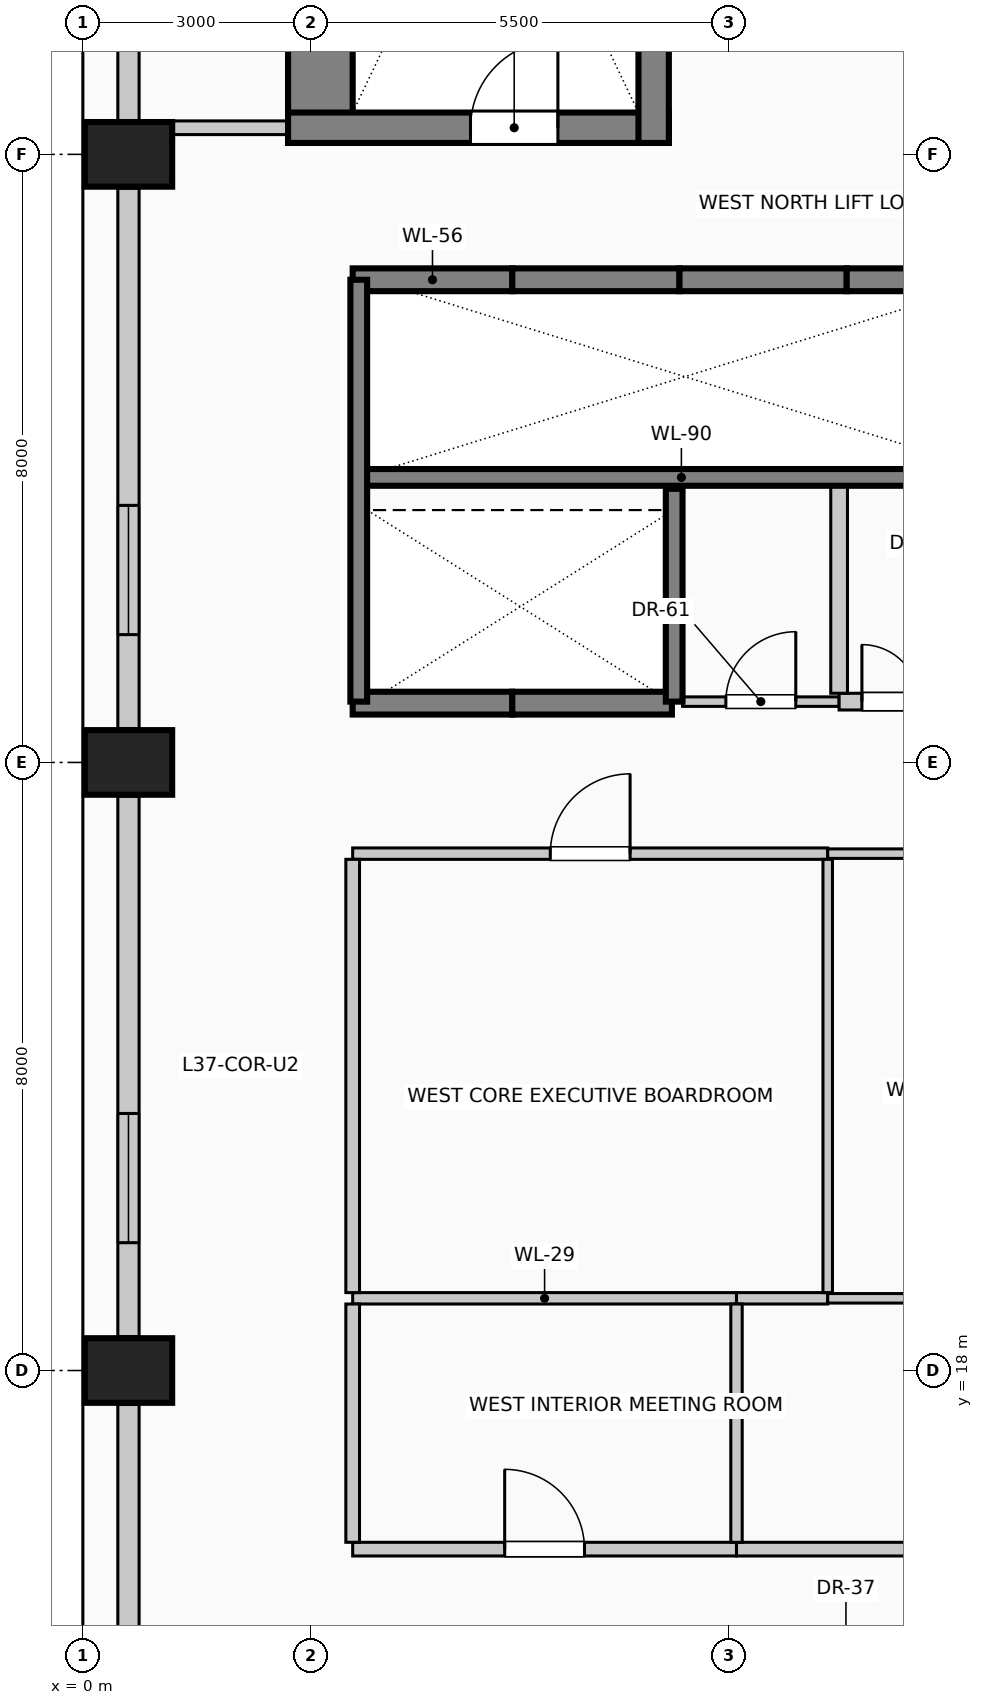
"""IFC4 building model, lengths in metres.
Left out: names, types, materials, properties, quantities, classifications, styles, units other than length and angle.
Written with IfcOpenShell. Run it as: python <this file> out.ifc"""

import sys

from ifc_helpers import new_model, si_unit, direction, frame, frame_2d, origin, origin_2d, place, context, subcontext, project, spatial, rectangle, extrude, element, fill, save


model = new_model("IFC4")
c1 = context("Model", 3, precision=1e-05, world=origin(), true_north=direction((0.0, 1.0)))
c2 = subcontext(c1, "Body", "Model", "MODEL_VIEW")
j1 = project(units=[si_unit("LENGTHUNIT", "METRE"), si_unit("PLANEANGLEUNIT", "RADIAN")], contexts=[c1])
p1 = place(None, origin())
s1 = spatial("IfcSite", under=j1, at=p1, CompositionType="ELEMENT")
p2 = place(p1, origin())
s2 = spatial("IfcBuilding", under=s1, at=p2, CompositionType="ELEMENT")
p3 = place(p2, frame((0.0, 0.0, 152.6)))
s3 = spatial("IfcBuildingStorey", under=s2, at=p3, CompositionType="ELEMENT", Elevation=152.6)
p4 = place(p3, frame((3.125, 34.15, 0.0), z_axis=(0.0, 0.0, 1.0), x_axis=(0.0, 1.0, 0.0)))
e1 = element("IfcWall", 1, at=p4, inside=s3, PredefinedType="SHEAR", context=c2, shape_type="SweptSolid", body=[
    extrude(rectangle(XDim=9.13, YDim=0.85, at=frame_2d((4.565, 0.0))), origin(), (0.0, 0.0, 1.0), 4.0),
])
p5 = place(p3, frame((2.7, 34.35, 0.0), z_axis=(0.0, 0.0, 1.0), x_axis=(1.0, 0.0, 0.0)))
e2 = element("IfcWall", 2, at=p5, inside=s3, PredefinedType="SHEAR", context=c2, shape_type="SweptSolid", body=[
    extrude(rectangle(XDim=5.01, YDim=0.4, at=frame_2d((2.505, 0.0))), origin(), (0.0, 0.0, 1.0), 4.0),
])
p6 = place(p5, frame((2.4, 0.0, 0.0)))
e3 = element("IfcOpeningElement", 3, at=p6, cuts=e2, PredefinedType="OPENING", context=c2, shape_type="SweptSolid", body=[
    extrude(rectangle(XDim=1.15, YDim=2.2, at=frame_2d((0.575, 1.1))), frame((0.0, 0.21, 0.0), z_axis=(0.0, -1.0, 0.0), x_axis=(1.0, 0.0, 0.0)), (0.0, 0.0, 1.0), 0.42),
])
p7 = place(p3, frame((7.51, 34.15, 0.0), z_axis=(0.0, 0.0, 1.0), x_axis=(0.0, 1.0, 0.0)))
e4 = element("IfcWall", 4, at=p7, inside=s3, PredefinedType="SHEAR", context=c2, shape_type="SweptSolid", body=[
    extrude(rectangle(XDim=9.13, YDim=0.4, at=frame_2d((4.565, 0.0))), origin(), (0.0, 0.0, 1.0), 4.0),
])
for number, where, z_axis, x_axis in (
    (5, (0.6, 18.0, 0.0), (0.0, 0.0, 1.0), (0.0, 1.0, 0.0)),
    (6, (0.6, 26.0, 0.0), (0.0, 0.0, 1.0), (0.0, 1.0, 0.0)),
    (7, (0.6, 34.0, 0.0), (0.0, 0.0, 1.0), (0.0, 1.0, 0.0)),
):
    element("IfcColumn", number, at=place(p3, frame(where, z_axis=z_axis, x_axis=x_axis)), inside=s3, PredefinedType="COLUMN", context=c2, shape_type="SweptSolid", body=[
        extrude(rectangle(XDim=0.85, YDim=1.15, at=origin_2d()), origin(), (0.0, 0.0, 1.0), 4.0),
    ])
p8 = place(p3, frame((0.6, 10.445, 0.0), z_axis=(0.0, 0.0, 1.0), x_axis=(0.0, 1.0, 0.0)))
e8 = element("IfcWall", 8, at=p8, inside=s3, PredefinedType="SOLIDWALL", context=c2, shape_type="SweptSolid", body=[
    extrude(rectangle(XDim=7.11, YDim=0.28, at=frame_2d((3.555, 0.0))), origin(), (0.0, 0.0, 1.0), 2.875),
])
p9 = place(p3, frame((0.6, 18.445, 0.0), z_axis=(0.0, 0.0, 1.0), x_axis=(0.0, 1.0, 0.0)))
e9 = element("IfcWall", 9, at=p9, inside=s3, PredefinedType="SOLIDWALL", context=c2, shape_type="SweptSolid", body=[
    extrude(rectangle(XDim=7.11, YDim=0.28, at=frame_2d((3.555, 0.0))), origin(), (0.0, 0.0, 1.0), 2.875),
])
p10 = place(p9, frame((1.237, 0.0, 0.5)))
e10 = element("IfcOpeningElement", 10, at=p10, cuts=e9, PredefinedType="OPENING", context=c2, shape_type="SweptSolid", body=[
    extrude(rectangle(XDim=1.7, YDim=1.95, at=frame_2d((0.85, 0.975))), frame((0.0, 0.15, 0.0), z_axis=(0.0, -1.0, 0.0), x_axis=(1.0, 0.0, 0.0)), (0.0, 0.0, 1.0), 0.3),
])
p11 = place(p3, frame((0.6, 26.445, 0.0), z_axis=(0.0, 0.0, 1.0), x_axis=(0.0, 1.0, 0.0)))
e11 = element("IfcWall", 11, at=p11, inside=s3, PredefinedType="SOLIDWALL", context=c2, shape_type="SweptSolid", body=[
    extrude(rectangle(XDim=7.11, YDim=0.28, at=frame_2d((3.555, 0.0))), origin(), (0.0, 0.0, 1.0), 2.875),
])
p12 = place(p11, frame((1.237, 0.0, 0.5)))
e12 = element("IfcOpeningElement", 12, at=p12, cuts=e11, PredefinedType="OPENING", context=c2, shape_type="SweptSolid", body=[
    extrude(rectangle(XDim=1.7, YDim=1.95, at=frame_2d((0.85, 0.975))), frame((0.0, 0.15, 0.0), z_axis=(0.0, -1.0, 0.0), x_axis=(1.0, 0.0, 0.0)), (0.0, 0.0, 1.0), 0.3),
])
p13 = place(p3, frame((0.6, 34.445, 0.0), z_axis=(0.0, 0.0, 1.0), x_axis=(0.0, 1.0, 0.0)))
e13 = element("IfcWall", 13, at=p13, inside=s3, PredefinedType="SOLIDWALL", context=c2, shape_type="SweptSolid", body=[
    extrude(rectangle(XDim=7.51, YDim=0.28, at=frame_2d((3.755, 0.0))), origin(), (0.0, 0.0, 1.0), 2.875),
])
p14 = place(p3, frame((3.55, 32.35, 0.0), z_axis=(0.0, 0.0, 1.0), x_axis=(1.0, 0.0, 0.0)))
e14 = element("IfcWall", 14, at=p14, inside=s3, PredefinedType="SOLIDWALL", context=c2, shape_type="SweptSolid", body=[
    extrude(rectangle(XDim=2.1, YDim=0.3, at=frame_2d((1.05, 0.0))), origin(), (0.0, 0.0, 1.0), 4.0),
])
p15 = place(p3, frame((5.65, 32.35, 0.0), z_axis=(0.0, 0.0, 1.0), x_axis=(1.0, 0.0, 0.0)))
e15 = element("IfcWall", 15, at=p15, inside=s3, PredefinedType="SOLIDWALL", context=c2, shape_type="SweptSolid", body=[
    extrude(rectangle(XDim=2.2, YDim=0.3, at=frame_2d((1.1, 0.0))), origin(), (0.0, 0.0, 1.0), 4.0),
])
p16 = place(p3, frame((7.85, 32.35, 0.0), z_axis=(0.0, 0.0, 1.0), x_axis=(1.0, 0.0, 0.0)))
e16 = element("IfcWall", 16, at=p16, inside=s3, PredefinedType="SOLIDWALL", context=c2, shape_type="SweptSolid", body=[
    extrude(rectangle(XDim=2.2, YDim=0.3, at=frame_2d((1.1, 0.0))), origin(), (0.0, 0.0, 1.0), 4.0),
])
p17 = place(p3, frame((10.05, 32.35, 0.0), z_axis=(0.0, 0.0, 1.0), x_axis=(1.0, 0.0, 0.0)))
e17 = element("IfcWall", 17, at=p17, inside=s3, PredefinedType="SOLIDWALL", context=c2, shape_type="SweptSolid", body=[
    extrude(rectangle(XDim=2.15, YDim=0.3, at=frame_2d((1.075, 0.0))), origin(), (0.0, 0.0, 1.0), 4.0),
])
p18 = place(p3, frame((5.65, 26.78, 0.0), z_axis=(0.0, 0.0, 1.0), x_axis=(-1.0, 0.0, 0.0)))
e18 = element("IfcWall", 18, at=p18, inside=s3, PredefinedType="SOLIDWALL", context=c2, shape_type="SweptSolid", body=[
    extrude(rectangle(XDim=2.1, YDim=0.3, at=frame_2d((1.05, 0.0))), origin(), (0.0, 0.0, 1.0), 4.0),
])
p19 = place(p3, frame((7.75, 26.78, 0.0), z_axis=(0.0, 0.0, 1.0), x_axis=(-1.0, 0.0, 0.0)))
e19 = element("IfcWall", 19, at=p19, inside=s3, PredefinedType="SOLIDWALL", context=c2, shape_type="SweptSolid", body=[
    extrude(rectangle(XDim=2.1, YDim=0.3, at=frame_2d((1.05, 0.0))), origin(), (0.0, 0.0, 1.0), 4.0),
])
p20 = place(p3, frame((3.55, 29.75, 0.0), z_axis=(0.0, 0.0, 1.0), x_axis=(1.0, 0.0, 0.0)))
e20 = element("IfcWall", 20, at=p20, inside=s3, PredefinedType="SOLIDWALL", context=c2, shape_type="SweptSolid", body=[
    extrude(rectangle(XDim=8.65, YDim=0.22, at=frame_2d((4.325, 0.0))), origin(), (0.0, 0.0, 1.0), 4.0),
])
p21 = place(p3, frame((3.63, 26.8, 0.0), z_axis=(0.0, 0.0, 1.0), x_axis=(0.0, 1.0, 0.0)))
e21 = element("IfcWall", 21, at=p21, inside=s3, PredefinedType="SOLIDWALL", context=c2, shape_type="SweptSolid", body=[
    extrude(rectangle(XDim=5.55, YDim=0.22, at=frame_2d((2.775, 0.0))), origin(), (0.0, 0.0, 1.0), 4.0),
])
p22 = place(p3, frame((7.78, 26.8, 0.0), z_axis=(0.0, 0.0, 1.0), x_axis=(0.0, 1.0, 0.0)))
e22 = element("IfcWall", 22, at=p22, inside=s3, PredefinedType="SOLIDWALL", context=c2, shape_type="SweptSolid", body=[
    extrude(rectangle(XDim=2.8, YDim=0.22, at=frame_2d((1.4, 0.0))), origin(), (0.0, 0.0, 1.0), 4.0),
])
p23 = place(p3, frame((3.55, 15.65, 0.0), z_axis=(0.0, 0.0, 1.0), x_axis=(1.0, 0.0, 0.0)))
e23 = element("IfcWall", 23, at=p23, inside=s3, PredefinedType="PARTITIONING", context=c2, shape_type="SweptSolid", body=[
    extrude(rectangle(XDim=5.05, YDim=0.18, at=frame_2d((2.525, 0.0))), origin(), (0.0, 0.0, 1.0), 3.725),
])
p24 = place(p23, frame((2.0, 0.0, 0.0)))
e24 = element("IfcOpeningElement", 24, at=p24, cuts=e23, PredefinedType="OPENING", context=c2, shape_type="SweptSolid", body=[
    extrude(rectangle(XDim=1.05, YDim=2.15, at=frame_2d((0.525, 1.075))), frame((0.0, 0.1, 0.0), z_axis=(0.0, -1.0, 0.0), x_axis=(1.0, 0.0, 0.0)), (0.0, 0.0, 1.0), 0.2),
])
p25 = place(p3, frame((8.6, 15.65, 0.0), z_axis=(0.0, 0.0, 1.0), x_axis=(1.0, 0.0, 0.0)))
e25 = element("IfcWall", 25, at=p25, inside=s3, PredefinedType="PARTITIONING", context=c2, shape_type="SweptSolid", body=[
    extrude(rectangle(XDim=7.25, YDim=0.18, at=frame_2d((3.625, 0.0))), origin(), (0.0, 0.0, 1.0), 3.725),
])
p26 = place(p25, frame((3.15, 0.0, 0.0)))
e26 = element("IfcOpeningElement", 26, at=p26, cuts=e25, PredefinedType="OPENING", context=c2, shape_type="SweptSolid", body=[
    extrude(rectangle(XDim=0.95, YDim=2.15, at=frame_2d((0.475, 1.075))), frame((0.0, 0.1, 0.0), z_axis=(0.0, -1.0, 0.0), x_axis=(1.0, 0.0, 0.0)), (0.0, 0.0, 1.0), 0.2),
])
p27 = place(p3, frame((3.55, 18.95, 0.0), z_axis=(0.0, 0.0, 1.0), x_axis=(1.0, 0.0, 0.0)))
e27 = element("IfcWall", 27, at=p27, inside=s3, PredefinedType="PARTITIONING", context=c2, shape_type="SweptSolid", body=[
    extrude(rectangle(XDim=5.05, YDim=0.15, at=frame_2d((2.525, 0.0))), origin(), (0.0, 0.0, 1.0), 3.725),
])
p28 = place(p3, frame((8.6, 18.95, 0.0), z_axis=(0.0, 0.0, 1.0), x_axis=(1.0, 0.0, 0.0)))
e28 = element("IfcWall", 28, at=p28, inside=s3, PredefinedType="PARTITIONING", context=c2, shape_type="SweptSolid", body=[
    extrude(rectangle(XDim=1.2, YDim=0.15, at=frame_2d((0.6, 0.0))), origin(), (0.0, 0.0, 1.0), 3.725),
])
p29 = place(p3, frame((9.8, 18.95, 0.0), z_axis=(0.0, 0.0, 1.0), x_axis=(1.0, 0.0, 0.0)))
e29 = element("IfcWall", 29, at=p29, inside=s3, PredefinedType="PARTITIONING", context=c2, shape_type="SweptSolid", body=[
    extrude(rectangle(XDim=6.05, YDim=0.125, at=frame_2d((3.025, 0.0))), origin(), (0.0, 0.0, 1.0), 3.725),
])
p30 = place(p3, frame((3.55, 24.8, 0.0), z_axis=(0.0, 0.0, 1.0), x_axis=(1.0, 0.0, 0.0)))
e30 = element("IfcWall", 30, at=p30, inside=s3, PredefinedType="PARTITIONING", context=c2, shape_type="SweptSolid", body=[
    extrude(rectangle(XDim=6.25, YDim=0.15, at=frame_2d((3.125, 0.0))), origin(), (0.0, 0.0, 1.0), 3.725),
])
p31 = place(p30, frame((2.6, 0.0, 0.0)))
e31 = element("IfcOpeningElement", 31, at=p31, cuts=e30, PredefinedType="OPENING", context=c2, shape_type="SweptSolid", body=[
    extrude(rectangle(XDim=1.05, YDim=2.15, at=frame_2d((0.525, 1.075))), frame((0.0, 0.085, 0.0), z_axis=(0.0, -1.0, 0.0), x_axis=(1.0, 0.0, 0.0)), (0.0, 0.0, 1.0), 0.17),
])
p32 = place(p3, frame((9.8, 24.8, 0.0), z_axis=(0.0, 0.0, 1.0), x_axis=(1.0, 0.0, 0.0)))
e32 = element("IfcWall", 32, at=p32, inside=s3, PredefinedType="PARTITIONING", context=c2, shape_type="SweptSolid", body=[
    extrude(rectangle(XDim=6.05, YDim=0.125, at=frame_2d((3.025, 0.0))), origin(), (0.0, 0.0, 1.0), 3.725),
])
p33 = place(p32, frame((2.575, 0.0, 0.0)))
e33 = element("IfcOpeningElement", 33, at=p33, cuts=e32, PredefinedType="OPENING", context=c2, shape_type="SweptSolid", body=[
    extrude(rectangle(XDim=0.9, YDim=2.1, at=frame_2d((0.45, 1.05))), frame((0.0, 0.073, 0.0), z_axis=(0.0, -1.0, 0.0), x_axis=(1.0, 0.0, 0.0)), (0.0, 0.0, 1.0), 0.145),
])
p34 = place(p3, frame((7.89, 26.8, 0.0), z_axis=(0.0, 0.0, 1.0), x_axis=(1.0, 0.0, 0.0)))
e34 = element("IfcWall", 34, at=p34, inside=s3, PredefinedType="PARTITIONING", context=c2, shape_type="SweptSolid", body=[
    extrude(rectangle(XDim=2.06, YDim=0.125, at=frame_2d((1.03, 0.0))), origin(), (0.0, 0.0, 1.0), 3.725),
])
p35 = place(p34, frame((0.57, 0.0, 0.0)))
e35 = element("IfcOpeningElement", 35, at=p35, cuts=e34, PredefinedType="OPENING", context=c2, shape_type="SweptSolid", body=[
    extrude(rectangle(XDim=0.92, YDim=2.1, at=frame_2d((0.46, 1.05))), frame((0.0, 0.073, 0.0), z_axis=(0.0, -1.0, 0.0), x_axis=(1.0, 0.0, 0.0)), (0.0, 0.0, 1.0), 0.145),
])
p36 = place(p3, frame((9.95, 26.8, 0.0), z_axis=(0.0, 0.0, 1.0), x_axis=(1.0, 0.0, 0.0)))
e36 = element("IfcWall", 36, at=p36, inside=s3, PredefinedType="PARTITIONING", context=c2, shape_type="SweptSolid", body=[
    extrude(rectangle(XDim=2.1, YDim=0.22, at=frame_2d((1.05, 0.0))), origin(), (0.0, 0.0, 1.0), 3.725),
])
p37 = place(p36, frame((0.3, 0.0, 0.0)))
e37 = element("IfcOpeningElement", 37, at=p37, cuts=e36, PredefinedType="OPENING", context=c2, shape_type="SweptSolid", body=[
    extrude(rectangle(XDim=1.5, YDim=2.25, at=frame_2d((0.75, 1.125))), frame((0.0, 0.12, 0.0), z_axis=(0.0, -1.0, 0.0), x_axis=(1.0, 0.0, 0.0)), (0.0, 0.0, 1.0), 0.24),
])
p38 = place(p3, frame((1.175, 34.35, 0.0), z_axis=(0.0, 0.0, 1.0), x_axis=(1.0, 0.0, 0.0)))
e38 = element("IfcWall", 38, at=p38, inside=s3, PredefinedType="PARTITIONING", context=c2, shape_type="SweptSolid", body=[
    extrude(rectangle(XDim=1.525, YDim=0.18, at=frame_2d((0.762, 0.0))), origin(), (0.0, 0.0, 1.0), 3.725),
])
p39 = place(p3, frame((3.55, 15.74, 0.0), z_axis=(0.0, 0.0, 1.0), x_axis=(0.0, 1.0, 0.0)))
e39 = element("IfcWall", 39, at=p39, inside=s3, PredefinedType="PARTITIONING", context=c2, shape_type="SweptSolid", body=[
    extrude(rectangle(XDim=3.135, YDim=0.18, at=frame_2d((1.567, 0.0))), origin(), (0.0, 0.0, 1.0), 3.725),
])
p40 = place(p3, frame((3.55, 19.025, 0.0), z_axis=(0.0, 0.0, 1.0), x_axis=(0.0, 1.0, 0.0)))
e40 = element("IfcWall", 40, at=p40, inside=s3, PredefinedType="PARTITIONING", context=c2, shape_type="SweptSolid", body=[
    extrude(rectangle(XDim=5.7, YDim=0.18, at=frame_2d((2.85, 0.0))), origin(), (0.0, 0.0, 1.0), 3.725),
])
p41 = place(p3, frame((8.6, 15.74, 0.0), z_axis=(0.0, 0.0, 1.0), x_axis=(0.0, 1.0, 0.0)))
e41 = element("IfcWall", 41, at=p41, inside=s3, PredefinedType="PARTITIONING", context=c2, shape_type="SweptSolid", body=[
    extrude(rectangle(XDim=3.135, YDim=0.15, at=frame_2d((1.567, 0.0))), origin(), (0.0, 0.0, 1.0), 3.725),
])
p42 = place(p3, frame((9.8, 19.025, 0.0), z_axis=(0.0, 0.0, 1.0), x_axis=(0.0, 1.0, 0.0)))
e42 = element("IfcWall", 42, at=p42, inside=s3, PredefinedType="PARTITIONING", context=c2, shape_type="SweptSolid", body=[
    extrude(rectangle(XDim=5.7, YDim=0.125, at=frame_2d((2.85, 0.0))), origin(), (0.0, 0.0, 1.0), 3.725),
])
p43 = place(p3, frame((9.95, 26.91, 0.0), z_axis=(0.0, 0.0, 1.0), x_axis=(0.0, 1.0, 0.0)))
e43 = element("IfcWall", 43, at=p43, inside=s3, PredefinedType="PARTITIONING", context=c2, shape_type="SweptSolid", body=[
    extrude(rectangle(XDim=2.73, YDim=0.22, at=frame_2d((1.365, 0.0))), origin(), (0.0, 0.0, 1.0), 3.725),
])
p44 = place(p10, origin())
e44 = element("IfcWindow", 44, at=p44, inside=s3, PartitioningType="SINGLE_PANEL", PredefinedType="WINDOW", context=c2, shape_type="SweptSolid", body=[
    extrude(rectangle(XDim=1.7, YDim=1.95, at=frame_2d((0.85, 0.975))), frame((0.0, 0.03, 0.0), z_axis=(0.0, -1.0, 0.0), x_axis=(1.0, 0.0, 0.0)), (0.0, 0.0, 1.0), 0.06),
])
fill(e10, e44)
p45 = place(p12, origin())
e45 = element("IfcWindow", 45, at=p45, inside=s3, PartitioningType="SINGLE_PANEL", PredefinedType="WINDOW", context=c2, shape_type="SweptSolid", body=[
    extrude(rectangle(XDim=1.7, YDim=1.95, at=frame_2d((0.85, 0.975))), frame((0.0, 0.03, 0.0), z_axis=(0.0, -1.0, 0.0), x_axis=(1.0, 0.0, 0.0)), (0.0, 0.0, 1.0), 0.06),
])
fill(e12, e45)
p46 = place(p6, origin())
e46 = element("IfcDoor", 46, at=p46, inside=s3, OperationType="SINGLE_SWING_RIGHT", PredefinedType="DOOR", context=c2, shape_type="SweptSolid", body=[
    extrude(rectangle(XDim=1.15, YDim=2.2, at=frame_2d((0.575, 1.1))), frame((0.0, 0.025, 0.0), z_axis=(0.0, -1.0, 0.0), x_axis=(1.0, 0.0, 0.0)), (0.0, 0.0, 1.0), 0.05),
])
fill(e3, e46)
p47 = place(p24, origin())
e47 = element("IfcDoor", 47, at=p47, inside=s3, OperationType="SINGLE_SWING_LEFT", PredefinedType="DOOR", context=c2, shape_type="SweptSolid", body=[
    extrude(rectangle(XDim=1.05, YDim=2.15, at=frame_2d((0.525, 1.075))), frame((0.0, 0.025, 0.0), z_axis=(0.0, -1.0, 0.0), x_axis=(1.0, 0.0, 0.0)), (0.0, 0.0, 1.0), 0.05),
])
fill(e24, e47)
p48 = place(p31, origin())
e48 = element("IfcDoor", 48, at=p48, inside=s3, OperationType="SINGLE_SWING_RIGHT", PredefinedType="DOOR", context=c2, shape_type="SweptSolid", body=[
    extrude(rectangle(XDim=1.05, YDim=2.15, at=frame_2d((0.525, 1.075))), frame((0.0, 0.025, 0.0), z_axis=(0.0, -1.0, 0.0), x_axis=(1.0, 0.0, 0.0)), (0.0, 0.0, 1.0), 0.05),
])
fill(e31, e48)
p49 = place(p35, origin())
e49 = element("IfcDoor", 49, at=p49, inside=s3, OperationType="SINGLE_SWING_RIGHT", PredefinedType="DOOR", context=c2, shape_type="SweptSolid", body=[
    extrude(rectangle(XDim=0.92, YDim=2.1, at=frame_2d((0.46, 1.05))), frame((0.0, 0.025, 0.0), z_axis=(0.0, -1.0, 0.0), x_axis=(1.0, 0.0, 0.0)), (0.0, 0.0, 1.0), 0.05),
])
fill(e35, e49)
p50 = place(p37, origin())
e50 = element("IfcDoor", 50, at=p50, inside=s3, OperationType="DOUBLE_DOOR_SINGLE_SWING", PredefinedType="DOOR", context=c2, shape_type="SweptSolid", body=[
    extrude(rectangle(XDim=1.5, YDim=2.25, at=frame_2d((0.75, 1.125))), frame((0.0, 0.025, 0.0), z_axis=(0.0, -1.0, 0.0), x_axis=(1.0, 0.0, 0.0)), (0.0, 0.0, 1.0), 0.05),
])
fill(e37, e50)
save(model, sys.argv[1])
